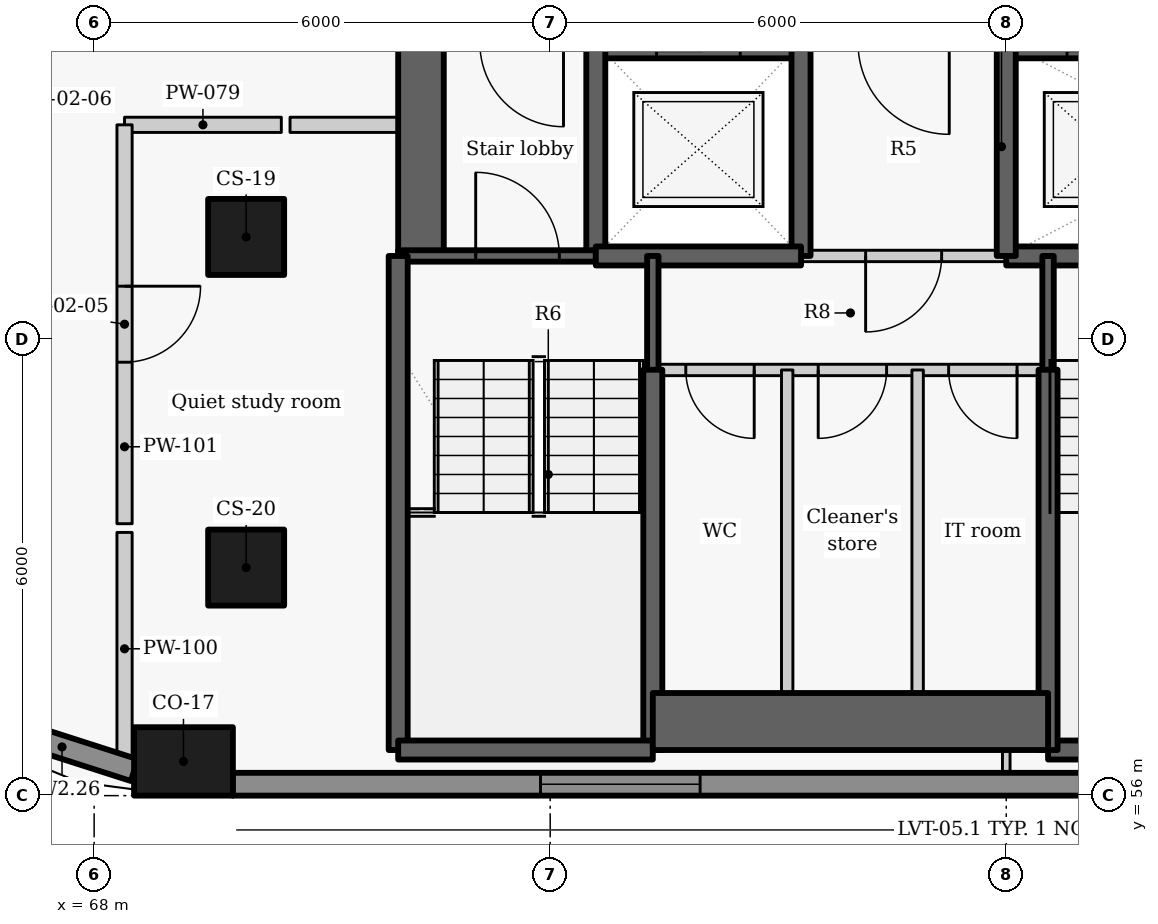
"""IFC4 building model, lengths in metres.
Left out: names, types, materials, properties, quantities, classifications, styles, units other than length and angle.
Written with IfcOpenShell. Run it as: python <this file> out.ifc"""

import sys

from ifc_helpers import new_model, si_unit, direction, frame, frame_2d, origin, origin_2d, place, context, subcontext, project, spatial, rectangle, extrude, element, fill, save


model = new_model("IFC4")
c1 = context("Model", 3, precision=1e-05, world=origin(), true_north=direction((0.0, 1.0)))
c2 = subcontext(c1, "Body", "Model", "MODEL_VIEW")
j1 = project(units=[si_unit("LENGTHUNIT", "METRE"), si_unit("PLANEANGLEUNIT", "RADIAN")], contexts=[c1])
p1 = place(None, origin())
s1 = spatial("IfcSite", under=j1, at=p1, CompositionType="ELEMENT")
p2 = place(p1, origin())
s2 = spatial("IfcBuilding", under=s1, at=p2, CompositionType="ELEMENT")
p3 = place(p2, frame((0.0, 0.0, 140.4)))
s3 = spatial("IfcBuildingStorey", under=s2, at=p3, CompositionType="ELEMENT", Elevation=140.4)
p4 = place(p3, frame((69.175, 56.45, 0.0), z_axis=(0.0, 0.0, 1.0), x_axis=(1.0, 0.0, 0.0)))
e1 = element("IfcColumn", 1, at=p4, inside=s3, PredefinedType="COLUMN", context=c2, shape_type="SweptSolid", body=[
    extrude(rectangle(XDim=1.3, YDim=0.9, at=origin_2d()), origin(), (0.0, 0.0, 1.0), 3.3),
])
for number, where, z_axis, x_axis in (
    (2, (70.0, 63.35, 0.0), (0.0, 0.0, 1.0), (0.0, -1.0, 0.0)),
    (3, (70.0, 59.0, 0.0), (0.0, 0.0, 1.0), (0.0, -1.0, 0.0)),
):
    element("IfcColumn", number, at=place(p3, frame(where, z_axis=z_axis, x_axis=x_axis)), inside=s3, PredefinedType="COLUMN", context=c2, shape_type="SweptSolid", body=[
        extrude(rectangle(XDim=1.0, YDim=1.0, at=origin_2d()), origin(), (0.0, 0.0, 1.0), 3.3),
    ])
p5 = place(p3, frame((66.626, 56.946, 0.0), z_axis=(0.0, 0.0, 1.0), x_axis=(0.952201240673, -0.305471434444, 0.0)))
e4 = element("IfcWall", 4, at=p5, inside=s3, PredefinedType="SOLIDWALL", context=c2, shape_type="SweptSolid", body=[
    extrude(rectangle(XDim=1.999, YDim=0.3, at=frame_2d((1.0, 0.0))), origin(), (0.0, 0.0, 1.0), 2.425),
])
p6 = place(p3, frame((69.821, 56.15, 0.0), z_axis=(0.0, 0.0, 1.0), x_axis=(1.0, 0.0, 0.0)))
e5 = element("IfcWall", 5, at=p6, inside=s3, PredefinedType="SOLIDWALL", context=c2, shape_type="SweptSolid", body=[
    extrude(rectangle(XDim=20.04, YDim=0.3, at=frame_2d((10.02, 0.0))), origin(), (0.0, 0.0, 1.0), 2.425),
])
p7 = place(p6, frame((4.051, 0.0, 0.9)))
e6 = element("IfcOpeningElement", 6, at=p7, cuts=e5, PredefinedType="OPENING", context=c2, shape_type="SweptSolid", body=[
    extrude(rectangle(XDim=2.1, YDim=1.1, at=frame_2d((1.05, 0.55))), frame((0.0, 0.16, 0.0), z_axis=(0.0, -1.0, 0.0), x_axis=(1.0, 0.0, 0.0)), (0.0, 0.0, 1.0), 0.32),
])
p8 = place(p6, frame((14.047, 0.0, 0.9)))
e7 = element("IfcOpeningElement", 7, at=p8, cuts=e5, PredefinedType="OPENING", context=c2, shape_type="SweptSolid", body=[
    extrude(rectangle(XDim=2.1, YDim=1.1, at=frame_2d((1.05, 0.55))), frame((0.0, 0.16, 0.0), z_axis=(0.0, -1.0, 0.0), x_axis=(1.0, 0.0, 0.0)), (0.0, 0.0, 1.0), 0.32),
])
p9 = place(p3, frame((72.3, 63.1, -0.275), z_axis=(0.0, 0.0, 1.0), x_axis=(0.0, 1.0, 0.0)))
e8 = element("IfcWall", 8, at=p9, inside=s3, PredefinedType="SHEAR", context=c2, shape_type="SweptSolid", body=[
    extrude(rectangle(XDim=9.1, YDim=0.6, at=frame_2d((4.55, 0.0))), origin(), (0.0, 0.0, 1.0), 3.3),
])
p10 = place(p9, frame((3.748, 0.0, 0.275)))
e9 = element("IfcOpeningElement", 9, at=p10, cuts=e8, PredefinedType="OPENING", context=c2, shape_type="SweptSolid", body=[
    extrude(rectangle(XDim=1.5, YDim=2.1, at=frame_2d((0.75, 1.05))), frame((0.0, 0.31, 0.0), z_axis=(0.0, -1.0, 0.0), x_axis=(1.0, 0.0, 0.0)), (0.0, 0.0, 1.0), 0.62),
])
p11 = place(p3, frame((74.597, 65.9, -0.275), z_axis=(0.0, 0.0, 1.0), x_axis=(1.0, 0.0, 0.0)))
e10 = element("IfcWall", 10, at=p11, inside=s3, PredefinedType="SHEAR", context=c2, shape_type="SweptSolid", body=[
    extrude(rectangle(XDim=2.706, YDim=0.4, at=frame_2d((1.353, 0.0))), origin(), (0.0, 0.0, 1.0), 3.3),
])
p12 = place(p11, frame((0.803, 0.0, 0.275)))
e11 = element("IfcOpeningElement", 11, at=p12, cuts=e10, PredefinedType="OPENING", context=c2, shape_type="SweptSolid", body=[
    extrude(rectangle(XDim=1.1, YDim=2.1, at=frame_2d((0.55, 1.05))), frame((0.0, 0.21, 0.0), z_axis=(0.0, -1.0, 0.0), x_axis=(1.0, 0.0, 0.0)), (0.0, 0.0, 1.0), 0.42),
])
p13 = place(p3, frame((79.997, 65.9, -0.275), z_axis=(0.0, 0.0, 1.0), x_axis=(1.0, 0.0, 0.0)))
e12 = element("IfcWall", 12, at=p13, inside=s3, PredefinedType="SHEAR", context=c2, shape_type="SweptSolid", body=[
    extrude(rectangle(XDim=5.406, YDim=0.4, at=frame_2d((2.703, 0.0))), origin(), (0.0, 0.0, 1.0), 3.3),
])
p14 = place(p13, frame((0.803, 0.0, 0.275)))
e13 = element("IfcOpeningElement", 13, at=p14, cuts=e12, PredefinedType="OPENING", context=c2, shape_type="SweptSolid", body=[
    extrude(rectangle(XDim=1.1, YDim=2.1, at=frame_2d((0.55, 1.05))), frame((0.0, 0.21, 0.0), z_axis=(0.0, -1.0, 0.0), x_axis=(1.0, 0.0, 0.0)), (0.0, 0.0, 1.0), 0.42),
])
p15 = place(p3, frame((74.6, 63.1, -0.275), z_axis=(0.0, 0.0, 1.0), x_axis=(0.0, 1.0, 0.0)))
e14 = element("IfcWall", 14, at=p15, inside=s3, PredefinedType="SHEAR", context=c2, shape_type="SweptSolid", body=[
    extrude(rectangle(XDim=2.8, YDim=0.25, at=frame_2d((1.4, 0.0))), origin(), (0.0, 0.0, 1.0), 3.3),
])
p16 = place(p3, frame((72.0, 63.1, -0.275), z_axis=(0.0, 0.0, 1.0), x_axis=(1.0, 0.0, 0.0)))
e15 = element("IfcWall", 15, at=p16, inside=s3, PredefinedType="SHEAR", context=c2, shape_type="SweptSolid", body=[
    extrude(rectangle(XDim=2.6, YDim=0.15, at=frame_2d((1.3, 0.0))), origin(), (0.0, 0.0, 1.0), 3.3),
])
p17 = place(p16, frame((1.02, 0.0, 0.275)))
e16 = element("IfcOpeningElement", 16, at=p17, cuts=e15, PredefinedType="OPENING", context=c2, shape_type="SweptSolid", body=[
    extrude(rectangle(XDim=1.1, YDim=2.1, at=frame_2d((0.55, 1.05))), frame((0.0, 0.085, 0.0), z_axis=(0.0, -1.0, 0.0), x_axis=(1.0, 0.0, 0.0)), (0.0, 0.0, 1.0), 0.17),
])
p18 = place(p3, frame((77.3, 63.1, -0.275), z_axis=(0.0, 0.0, 1.0), x_axis=(0.0, 1.0, 0.0)))
e17 = element("IfcWall", 17, at=p18, inside=s3, PredefinedType="SHEAR", context=c2, shape_type="SweptSolid", body=[
    extrude(rectangle(XDim=2.8, YDim=0.25, at=frame_2d((1.4, 0.0))), origin(), (0.0, 0.0, 1.0), 3.3),
])
p19 = place(p3, frame((74.6, 63.1, -0.275), z_axis=(0.0, 0.0, 1.0), x_axis=(1.0, 0.0, 0.0)))
e18 = element("IfcWall", 18, at=p19, inside=s3, PredefinedType="SHEAR", context=c2, shape_type="SweptSolid", body=[
    extrude(rectangle(XDim=2.7, YDim=0.25, at=frame_2d((1.35, 0.0))), origin(), (0.0, 0.0, 1.0), 3.3),
])
p20 = place(p3, frame((80.0, 63.1, -0.275), z_axis=(0.0, 0.0, 1.0), x_axis=(1.0, 0.0, 0.0)))
e19 = element("IfcWall", 19, at=p20, inside=s3, PredefinedType="SHEAR", context=c2, shape_type="SweptSolid", body=[
    extrude(rectangle(XDim=8.0, YDim=0.25, at=frame_2d((4.0, 0.0))), origin(), (0.0, 0.0, 1.0), 3.3),
])
p21 = place(p20, frame((3.849, 0.0, 0.275)))
e20 = element("IfcOpeningElement", 20, at=p21, cuts=e19, PredefinedType="OPENING", context=c2, shape_type="SweptSolid", body=[
    extrude(rectangle(XDim=1.1, YDim=2.1, at=frame_2d((0.55, 1.05))), frame((0.0, 0.135, 0.0), z_axis=(0.0, -1.0, 0.0), x_axis=(1.0, 0.0, 0.0)), (0.0, 0.0, 1.0), 0.27),
])
p22 = place(p3, frame((80.0, 63.1, -0.275), z_axis=(0.0, 0.0, 1.0), x_axis=(0.0, 1.0, 0.0)))
e21 = element("IfcWall", 21, at=p22, inside=s3, PredefinedType="SHEAR", context=c2, shape_type="SweptSolid", body=[
    extrude(rectangle(XDim=2.8, YDim=0.25, at=frame_2d((1.4, 0.0))), origin(), (0.0, 0.0, 1.0), 3.3),
])
p23 = place(p3, frame((80.0, 63.1, 0.0), z_axis=(0.0, 0.0, 1.0), x_axis=(-1.0, 0.0, 0.0)))
e22 = element("IfcWall", 22, at=p23, inside=s3, PredefinedType="PARTITIONING", context=c2, shape_type="SweptSolid", body=[
    extrude(rectangle(XDim=2.7, YDim=0.15, at=frame_2d((1.35, 0.0))), origin(), (0.0, 0.0, 1.0), 3.025),
])
p24 = place(p23, frame((0.85, 0.0, 0.0)))
e23 = element("IfcOpeningElement", 23, at=p24, cuts=e22, PredefinedType="OPENING", context=c2, shape_type="SweptSolid", body=[
    extrude(rectangle(XDim=1.0, YDim=2.1, at=frame_2d((0.5, 1.05))), frame((0.0, 0.085, 0.0), z_axis=(0.0, -1.0, 0.0), x_axis=(1.0, 0.0, 0.0)), (0.0, 0.0, 1.0), 0.17),
])
p25 = place(p3, frame((75.35, 61.597, -0.275), z_axis=(0.0, 0.0, 1.0), x_axis=(0.0, 1.0, 0.0)))
e24 = element("IfcWall", 24, at=p25, inside=s3, PredefinedType="SHEAR", context=c2, shape_type="SweptSolid", body=[
    extrude(rectangle(XDim=1.503, YDim=0.15, at=frame_2d((0.751, 0.0))), origin(), (0.0, 0.0, 1.0), 3.3),
])
p26 = place(p3, frame((75.35, 56.6, -0.275), z_axis=(0.0, 0.0, 1.0), x_axis=(0.0, 1.0, 0.0)))
e25 = element("IfcWall", 25, at=p26, inside=s3, PredefinedType="SHEAR", context=c2, shape_type="SweptSolid", body=[
    extrude(rectangle(XDim=5.003, YDim=0.25, at=frame_2d((2.501, 0.0))), origin(), (0.0, 0.0, 1.0), 3.3),
])
p27 = place(p3, frame((72.0, 56.6, -0.275), z_axis=(0.0, 0.0, 1.0), x_axis=(0.0, 1.0, 0.0)))
e26 = element("IfcWall", 26, at=p27, inside=s3, PredefinedType="SHEAR", context=c2, shape_type="SweptSolid", body=[
    extrude(rectangle(XDim=6.5, YDim=0.25, at=frame_2d((3.25, 0.0))), origin(), (0.0, 0.0, 1.0), 3.3),
])
p28 = place(p3, frame((72.0, 56.6, -0.275), z_axis=(0.0, 0.0, 1.0), x_axis=(1.0, 0.0, 0.0)))
e27 = element("IfcWall", 27, at=p28, inside=s3, PredefinedType="SHEAR", context=c2, shape_type="SweptSolid", body=[
    extrude(rectangle(XDim=3.35, YDim=0.25, at=frame_2d((1.675, 0.0))), origin(), (0.0, 0.0, 1.0), 3.3),
])
p29 = place(p3, frame((80.55, 56.6, -0.275), z_axis=(0.0, 0.0, 1.0), x_axis=(1.0, 0.0, 0.0)))
e28 = element("IfcWall", 28, at=p29, inside=s3, PredefinedType="SHEAR", context=c2, shape_type="SweptSolid", body=[
    extrude(rectangle(XDim=2.85, YDim=0.25, at=frame_2d((1.425, 0.0))), origin(), (0.0, 0.0, 1.0), 3.3),
])
p30 = place(p3, frame((80.55, 61.597, -0.275), z_axis=(0.0, 0.0, 1.0), x_axis=(0.0, 1.0, 0.0)))
e29 = element("IfcWall", 29, at=p30, inside=s3, PredefinedType="SHEAR", context=c2, shape_type="SweptSolid", body=[
    extrude(rectangle(XDim=1.503, YDim=0.15, at=frame_2d((0.751, 0.0))), origin(), (0.0, 0.0, 1.0), 3.3),
])
p31 = place(p3, frame((80.55, 56.6, -0.275), z_axis=(0.0, 0.0, 1.0), x_axis=(0.0, 1.0, 0.0)))
e30 = element("IfcWall", 30, at=p31, inside=s3, PredefinedType="SHEAR", context=c2, shape_type="SweptSolid", body=[
    extrude(rectangle(XDim=5.003, YDim=0.25, at=frame_2d((2.501, 0.0))), origin(), (0.0, 0.0, 1.0), 3.3),
])
p32 = place(p3, frame((75.35, 56.975, -0.275), z_axis=(0.0, 0.0, 1.0), x_axis=(1.0, 0.0, 0.0)))
e31 = element("IfcWall", 31, at=p32, inside=s3, PredefinedType="SHEAR", context=c2, shape_type="SweptSolid", body=[
    extrude(rectangle(XDim=5.2, YDim=0.75, at=frame_2d((2.6, 0.0))), origin(), (0.0, 0.0, 1.0), 3.3),
])
p33 = place(p3, frame((80.55, 61.6, 0.0), z_axis=(0.0, 0.0, 1.0), x_axis=(-1.0, 0.0, 0.0)))
e32 = element("IfcWall", 32, at=p33, inside=s3, PredefinedType="PARTITIONING", context=c2, shape_type="SweptSolid", body=[
    extrude(rectangle(XDim=5.2, YDim=0.15, at=frame_2d((2.6, 0.0))), origin(), (0.0, 0.0, 1.0), 3.025),
])
p34 = place(p33, frame((3.866, 0.0, 0.0)))
e33 = element("IfcOpeningElement", 33, at=p34, cuts=e32, PredefinedType="OPENING", context=c2, shape_type="SweptSolid", body=[
    extrude(rectangle(XDim=0.9, YDim=2.1, at=frame_2d((0.45, 1.05))), frame((0.0, 0.085, 0.0), z_axis=(0.0, -1.0, 0.0), x_axis=(1.0, 0.0, 0.0)), (0.0, 0.0, 1.0), 0.17),
])
p35 = place(p33, frame((2.124, 0.0, 0.0)))
e34 = element("IfcOpeningElement", 34, at=p35, cuts=e32, PredefinedType="OPENING", context=c2, shape_type="SweptSolid", body=[
    extrude(rectangle(XDim=0.9, YDim=2.1, at=frame_2d((0.45, 1.05))), frame((0.0, 0.085, 0.0), z_axis=(0.0, -1.0, 0.0), x_axis=(1.0, 0.0, 0.0)), (0.0, 0.0, 1.0), 0.17),
])
p36 = place(p33, frame((0.408, 0.0, 0.0)))
e35 = element("IfcOpeningElement", 35, at=p36, cuts=e32, PredefinedType="OPENING", context=c2, shape_type="SweptSolid", body=[
    extrude(rectangle(XDim=0.9, YDim=2.1, at=frame_2d((0.45, 1.05))), frame((0.0, 0.085, 0.0), z_axis=(0.0, -1.0, 0.0), x_axis=(1.0, 0.0, 0.0)), (0.0, 0.0, 1.0), 0.17),
])
for number, where, z_axis, x_axis in (
    (36, (77.118, 56.6, 0.0), (0.0, 0.0, 1.0), (0.0, 1.0, 0.0)),
    (37, (78.834, 56.6, 0.0), (0.0, 0.0, 1.0), (0.0, 1.0, 0.0)),
):
    element("IfcWall", number, at=place(p3, frame(where, z_axis=z_axis, x_axis=x_axis)), inside=s3, PredefinedType="PARTITIONING", context=c2, shape_type="SweptSolid", body=[
        extrude(rectangle(XDim=5.0, YDim=0.15, at=frame_2d((2.5, 0.0))), origin(), (0.0, 0.0, 1.0), 3.025),
    ])
p37 = place(p3, frame((68.4, 64.825, 0.0), z_axis=(0.0, 0.0, 1.0), x_axis=(1.0, 0.0, 0.0)))
e38 = element("IfcWall", 38, at=p37, inside=s3, PredefinedType="PARTITIONING", context=c2, shape_type="SweptSolid", body=[
    extrude(rectangle(XDim=2.063, YDim=0.2, at=frame_2d((1.031, 0.0))), origin(), (0.0, 0.0, 1.0), 2.505),
])
p38 = place(p3, frame((70.577, 64.825, 0.0), z_axis=(0.0, 0.0, 1.0), x_axis=(1.0, 0.0, 0.0)))
e39 = element("IfcWall", 39, at=p38, inside=s3, PredefinedType="PARTITIONING", context=c2, shape_type="SweptSolid", body=[
    extrude(rectangle(XDim=1.423, YDim=0.2, at=frame_2d((0.711, 0.0))), origin(), (0.0, 0.0, 1.0), 3.025),
])
p39 = place(p3, frame((68.4, 56.401, 0.0), z_axis=(0.0, 0.0, 1.0), x_axis=(0.0, 1.0, 0.0)))
e40 = element("IfcWall", 40, at=p39, inside=s3, PredefinedType="PARTITIONING", context=c2, shape_type="SweptSolid", body=[
    extrude(rectangle(XDim=3.062, YDim=0.2, at=frame_2d((1.531, 0.0))), origin(), (0.0, 0.0, 1.0), 2.405),
])
p40 = place(p3, frame((68.4, 64.825, 0.0), z_axis=(0.0, 0.0, 1.0), x_axis=(0.0, -1.0, 0.0)))
e41 = element("IfcWall", 41, at=p40, inside=s3, PredefinedType="PARTITIONING", context=c2, shape_type="SweptSolid", body=[
    extrude(rectangle(XDim=5.248, YDim=0.2, at=frame_2d((2.624, 0.0))), origin(), (0.0, 0.0, 1.0), 3.025),
])
p41 = place(p40, frame((2.123, 0.0, 0.0)))
e42 = element("IfcOpeningElement", 42, at=p41, cuts=e41, PredefinedType="OPENING", context=c2, shape_type="SweptSolid", body=[
    extrude(rectangle(XDim=1.0, YDim=2.1, at=frame_2d((0.5, 1.05))), frame((0.0, 0.11, 0.0), z_axis=(0.0, -1.0, 0.0), x_axis=(1.0, 0.0, 0.0)), (0.0, 0.0, 1.0), 0.22),
])
p42 = place(p3, frame((80.0, 56.3, 0.0), z_axis=(0.0, 0.0, 1.0), x_axis=(0.0, 1.0, 0.0)))
e43 = element("IfcWall", 43, at=p42, inside=s3, PredefinedType="PARTITIONING", context=c2, shape_type="SweptSolid", body=[
    extrude(rectangle(XDim=0.3, YDim=0.1, at=frame_2d((0.15, 0.0))), origin(), (0.0, 0.0, 1.0), 3.025),
])
p43 = place(p7, origin())
e44 = element("IfcWindow", 44, at=p43, inside=s3, PartitioningType="SINGLE_PANEL", PredefinedType="WINDOW", context=c2, shape_type="SweptSolid", body=[
    extrude(rectangle(XDim=2.1, YDim=1.1, at=frame_2d((1.05, 0.55))), frame((0.0, 0.03, 0.0), z_axis=(0.0, -1.0, 0.0), x_axis=(1.0, 0.0, 0.0)), (0.0, 0.0, 1.0), 0.06),
])
fill(e6, e44)
p44 = place(p24, origin())
e45 = element("IfcDoor", 45, at=p44, inside=s3, OperationType="SINGLE_SWING_RIGHT", PredefinedType="DOOR", context=c2, shape_type="SweptSolid", body=[
    extrude(rectangle(XDim=1.0, YDim=2.1, at=frame_2d((0.5, 1.05))), frame((0.0, 0.025, 0.0), z_axis=(0.0, -1.0, 0.0), x_axis=(1.0, 0.0, 0.0)), (0.0, 0.0, 1.0), 0.05),
])
fill(e23, e45)
p45 = place(p34, origin())
e46 = element("IfcDoor", 46, at=p45, inside=s3, OperationType="SINGLE_SWING_LEFT", PredefinedType="DOOR", context=c2, shape_type="SweptSolid", body=[
    extrude(rectangle(XDim=0.9, YDim=2.1, at=frame_2d((0.45, 1.05))), frame((0.0, 0.025, 0.0), z_axis=(0.0, -1.0, 0.0), x_axis=(1.0, 0.0, 0.0)), (0.0, 0.0, 1.0), 0.05),
])
fill(e33, e46)
p46 = place(p35, origin())
e47 = element("IfcDoor", 47, at=p46, inside=s3, OperationType="SINGLE_SWING_RIGHT", PredefinedType="DOOR", context=c2, shape_type="SweptSolid", body=[
    extrude(rectangle(XDim=0.9, YDim=2.1, at=frame_2d((0.45, 1.05))), frame((0.0, 0.025, 0.0), z_axis=(0.0, -1.0, 0.0), x_axis=(1.0, 0.0, 0.0)), (0.0, 0.0, 1.0), 0.05),
])
fill(e34, e47)
p47 = place(p36, origin())
e48 = element("IfcDoor", 48, at=p47, inside=s3, OperationType="SINGLE_SWING_LEFT", PredefinedType="DOOR", context=c2, shape_type="SweptSolid", body=[
    extrude(rectangle(XDim=0.9, YDim=2.1, at=frame_2d((0.45, 1.05))), frame((0.0, 0.025, 0.0), z_axis=(0.0, -1.0, 0.0), x_axis=(1.0, 0.0, 0.0)), (0.0, 0.0, 1.0), 0.05),
])
fill(e35, e48)
p48 = place(p17, origin())
e49 = element("IfcDoor", 49, at=p48, inside=s3, OperationType="SINGLE_SWING_LEFT", PredefinedType="DOOR", context=c2, shape_type="SweptSolid", body=[
    extrude(rectangle(XDim=1.1, YDim=2.1, at=frame_2d((0.55, 1.05))), frame((0.0, 0.025, 0.0), z_axis=(0.0, -1.0, 0.0), x_axis=(1.0, 0.0, 0.0)), (0.0, 0.0, 1.0), 0.05),
])
fill(e16, e49)
p49 = place(p41, origin())
e50 = element("IfcDoor", 50, at=p49, inside=s3, OperationType="SINGLE_SWING_LEFT", PredefinedType="DOOR", context=c2, shape_type="SweptSolid", body=[
    extrude(rectangle(XDim=1.0, YDim=2.1, at=frame_2d((0.5, 1.05))), frame((0.0, 0.025, 0.0), z_axis=(0.0, -1.0, 0.0), x_axis=(1.0, 0.0, 0.0)), (0.0, 0.0, 1.0), 0.05),
])
fill(e42, e50)
save(model, sys.argv[1])
